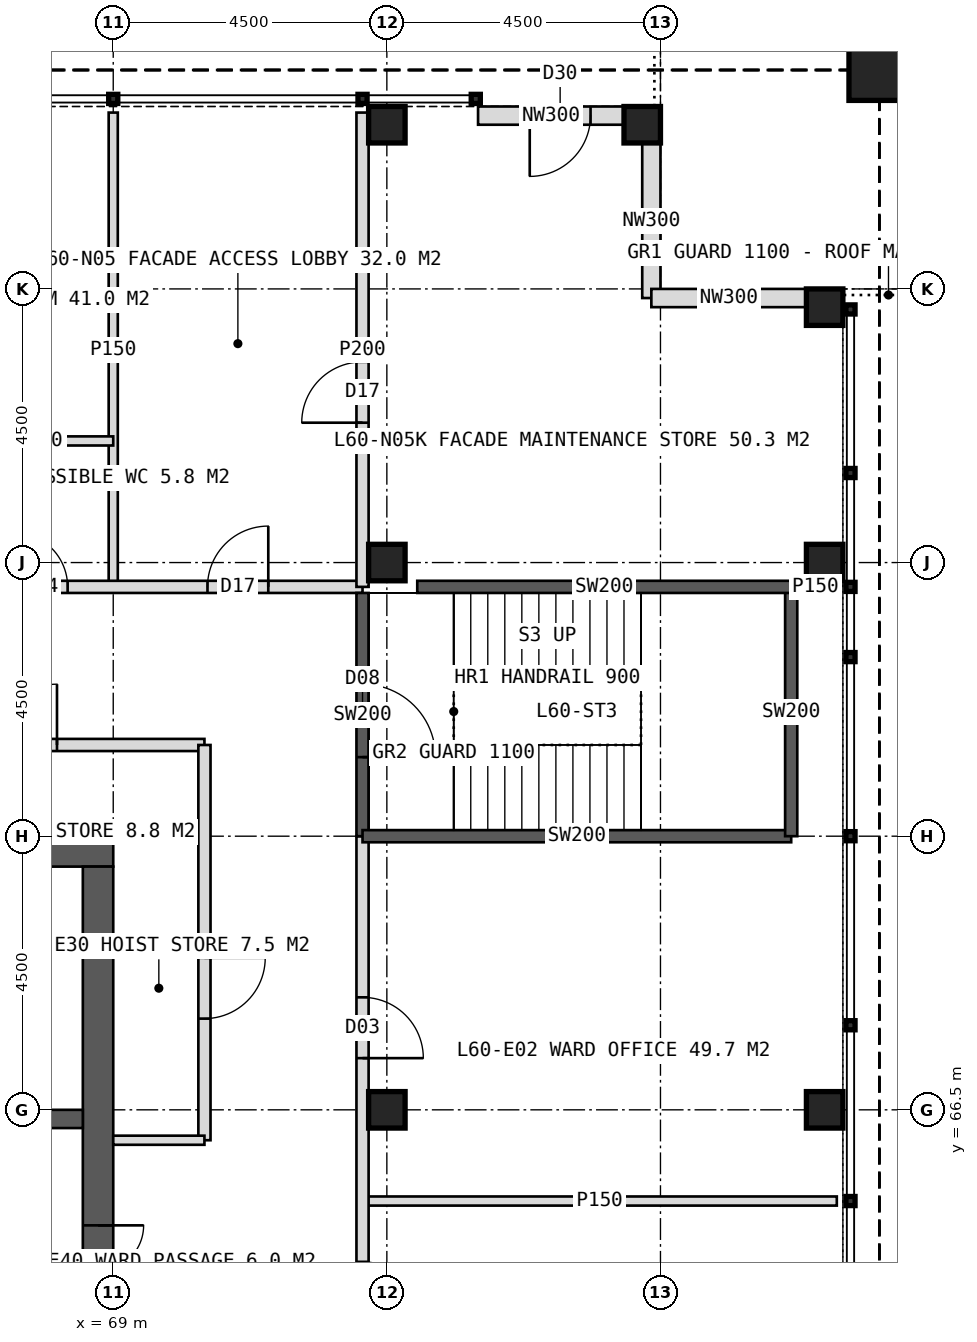
"""IFC4 building model, lengths in metres.
Left out: names, types, materials, properties, quantities, classifications, styles, units other than length and angle.
Written with IfcOpenShell. Run it as: python <this file> out.ifc"""

import sys

from ifc_helpers import new_model, si_unit, direction, frame, frame_2d, origin, origin_2d, place, context, subcontext, project, spatial, rectangle, hollow_rectangle, extrude, element, fill, save


model = new_model("IFC4")
c1 = context("Model", 3, precision=1e-05, world=origin(), true_north=direction((0.0, 1.0)))
c2 = subcontext(c1, "Body", "Model", "MODEL_VIEW")
j1 = project(units=[si_unit("LENGTHUNIT", "METRE"), si_unit("PLANEANGLEUNIT", "RADIAN")], contexts=[c1])
p1 = place(None, origin())
s1 = spatial("IfcSite", under=j1, at=p1, CompositionType="ELEMENT")
p2 = place(p1, origin())
s2 = spatial("IfcBuilding", under=s1, at=p2, CompositionType="ELEMENT")
p3 = place(p2, frame((0.0, 0.0, 250.0)))
s3 = spatial("IfcBuildingStorey", under=s2, at=p3, CompositionType="ELEMENT", Elevation=250.0)
p4 = place(p3, frame((51.0, 70.75, 0.0), z_axis=(0.0, 0.0, 1.0), x_axis=(1.0, 0.0, 0.0)))
e1 = element("IfcWall", 1, at=p4, inside=s3, PredefinedType="SHEAR", context=c2, shape_type="SweptSolid", body=[
    extrude(rectangle(XDim=18.0, YDim=0.5, at=frame_2d((9.0, 0.0))), origin(), (0.0, 0.0, 1.0), 4.0),
])
p5 = place(p4, frame((8.1, 0.0, 0.0)))
e2 = element("IfcOpeningElement", 2, at=p5, cuts=e1, PredefinedType="OPENING", context=c2, shape_type="SweptSolid", body=[
    extrude(rectangle(XDim=1.8, YDim=2.2, at=frame_2d((0.9, 1.1))), frame((0.0, 0.26, 0.0), z_axis=(0.0, -1.0, 0.0), x_axis=(1.0, 0.0, 0.0)), (0.0, 0.0, 1.0), 0.52),
])
p6 = place(p3, frame((68.75, 53.5, 0.0), z_axis=(0.0, 0.0, 1.0), x_axis=(0.0, 1.0, 0.0)))
e3 = element("IfcWall", 3, at=p6, inside=s3, PredefinedType="SHEAR", context=c2, shape_type="SweptSolid", body=[
    extrude(rectangle(XDim=17.0, YDim=0.5, at=frame_2d((8.5, 0.0))), origin(), (0.0, 0.0, 1.0), 4.0),
])
p7 = place(p6, frame((9.6, 0.0, 0.0)))
e4 = element("IfcOpeningElement", 4, at=p7, cuts=e3, PredefinedType="OPENING", context=c2, shape_type="SweptSolid", body=[
    extrude(rectangle(XDim=1.5, YDim=2.2, at=frame_2d((0.75, 1.1))), frame((0.0, 0.26, 0.0), z_axis=(0.0, -1.0, 0.0), x_axis=(1.0, 0.0, 0.0)), (0.0, 0.0, 1.0), 0.52),
])
p8 = place(p3, frame((65.2, 66.35, 0.0), z_axis=(0.0, 0.0, 1.0), x_axis=(1.0, 0.0, 0.0)))
e5 = element("IfcWall", 5, at=p8, inside=s3, PredefinedType="SHEAR", context=c2, shape_type="SweptSolid", body=[
    extrude(rectangle(XDim=3.3, YDim=0.3, at=frame_2d((1.65, 0.0))), origin(), (0.0, 0.0, 1.0), 4.0),
])
p9 = place(p8, frame((1.05, 0.0, 0.0)))
e6 = element("IfcOpeningElement", 6, at=p9, cuts=e5, PredefinedType="OPENING", context=c2, shape_type="SweptSolid", body=[
    extrude(rectangle(XDim=1.2, YDim=2.2, at=frame_2d((0.6, 1.1))), frame((0.0, 0.16, 0.0), z_axis=(0.0, -1.0, 0.0), x_axis=(1.0, 0.0, 0.0)), (0.0, 0.0, 1.0), 0.32),
])
for number, where, z_axis, x_axis in (
    (7, (73.5, 75.5, 0.0), (0.0, 0.0, 1.0), (1.0, 0.0, 0.0)),
    (8, (73.5, 66.5, 0.0), (0.0, 0.0, 1.0), (1.0, 0.0, 0.0)),
    (9, (80.7, 66.5, 0.0), (0.0, 0.0, 1.0), (1.0, 0.0, 0.0)),
    (10, (73.5, 82.7, 0.0), (0.0, 0.0, 1.0), (1.0, 0.0, 0.0)),
    (11, (80.7, 75.5, 0.0), (0.0, 0.0, 1.0), (1.0, 0.0, 0.0)),
    (12, (77.7, 82.7, 0.0), (0.0, 0.0, 1.0), (1.0, 0.0, 0.0)),
    (13, (80.7, 79.7, 0.0), (0.0, 0.0, 1.0), (1.0, 0.0, 0.0)),
):
    element("IfcColumn", number, at=place(p3, frame(where, z_axis=z_axis, x_axis=x_axis)), inside=s3, PredefinedType="COLUMN", context=c2, shape_type="SweptSolid", body=[
        extrude(hollow_rectangle(XDim=0.6, YDim=0.6, WallThickness=0.04, at=origin_2d()), origin(), (0.0, 0.0, 1.0), 4.0),
    ])
p10 = place(p3, frame((81.6, 83.6, 2.0), z_axis=(0.0, 0.0, 1.0), x_axis=(1.0, 0.0, 0.0)))
e14 = element("IfcColumn", 14, at=p10, inside=s3, PredefinedType="COLUMN", context=c2, shape_type="SweptSolid", body=[
    extrude(hollow_rectangle(XDim=1.0, YDim=1.0, WallThickness=0.06, at=origin_2d()), origin(), (0.0, 0.0, 1.0), 2.0),
])
p11 = place(p3, frame((75.0, 82.85, 0.0), z_axis=(0.0, 0.0, 1.0), x_axis=(1.0, 0.0, 0.0)))
e15 = element("IfcWall", 15, at=p11, inside=s3, PredefinedType="ELEMENTEDWALL", context=c2, shape_type="SweptSolid", body=[
    extrude(rectangle(XDim=2.4, YDim=0.3, at=frame_2d((1.2, 0.0))), origin(), (0.0, 0.0, 1.0), 3.226),
])
p12 = place(p11, frame((0.85, 0.0, 0.0)))
e16 = element("IfcOpeningElement", 16, at=p12, cuts=e15, PredefinedType="OPENING", context=c2, shape_type="SweptSolid", body=[
    extrude(rectangle(XDim=1.0, YDim=2.1, at=frame_2d((0.5, 1.05))), frame((0.0, 0.16, 0.0), z_axis=(0.0, -1.0, 0.0), x_axis=(1.0, 0.0, 0.0)), (0.0, 0.0, 1.0), 0.32),
])
for number, where, z_axis, x_axis in (
    (17, (77.85, 82.4, 0.0), (0.0, 0.0, 1.0), (0.0, -1.0, 0.0)),
    (18, (77.85, 79.85, 0.0), (0.0, 0.0, 1.0), (1.0, 0.0, 0.0)),
):
    element("IfcWall", number, at=place(p3, frame(where, z_axis=z_axis, x_axis=x_axis)), inside=s3, PredefinedType="ELEMENTEDWALL", context=c2, shape_type="SweptSolid", body=[
        extrude(rectangle(XDim=2.55, YDim=0.3, at=frame_2d((1.275, 0.0))), origin(), (0.0, 0.0, 1.0), 2.95),
    ])
p13 = place(p3, frame((69.0, 75.1, 0.0), z_axis=(0.0, 0.0, 1.0), x_axis=(0.0, 1.0, 0.0)))
e19 = element("IfcWall", 19, at=p13, inside=s3, PredefinedType="PARTITIONING", context=c2, shape_type="SweptSolid", body=[
    extrude(rectangle(XDim=7.8, YDim=0.15, at=frame_2d((3.9, 0.0))), origin(), (0.0, 0.0, 1.0), 3.75),
])
p14 = place(p3, frame((46.9, 75.1, 0.0), z_axis=(0.0, 0.0, 1.0), x_axis=(1.0, 0.0, 0.0)))
e20 = element("IfcWall", 20, at=p14, inside=s3, PredefinedType="PARTITIONING", context=c2, shape_type="SweptSolid", body=[
    extrude(rectangle(XDim=26.2, YDim=0.2, at=frame_2d((13.1, 0.0))), origin(), (0.0, 0.0, 1.0), 3.75),
])
p15 = place(p14, frame((1.75, 0.0, 0.0)))
e21 = element("IfcOpeningElement", 21, at=p15, cuts=e20, PredefinedType="OPENING", context=c2, shape_type="SweptSolid", body=[
    extrude(rectangle(XDim=1.2, YDim=2.2, at=frame_2d((0.6, 1.1))), frame((0.0, 0.11, 0.0), z_axis=(0.0, -1.0, 0.0), x_axis=(1.0, 0.0, 0.0)), (0.0, 0.0, 1.0), 0.22),
])
p16 = place(p14, frame((6.75, 0.0, 0.0)))
e22 = element("IfcOpeningElement", 22, at=p16, cuts=e20, PredefinedType="OPENING", context=c2, shape_type="SweptSolid", body=[
    extrude(rectangle(XDim=1.0, YDim=2.1, at=frame_2d((0.5, 1.05))), frame((0.0, 0.11, 0.0), z_axis=(0.0, -1.0, 0.0), x_axis=(1.0, 0.0, 0.0)), (0.0, 0.0, 1.0), 0.22),
])
p17 = place(p14, frame((12.75, 0.0, 0.0)))
e23 = element("IfcOpeningElement", 23, at=p17, cuts=e20, PredefinedType="OPENING", context=c2, shape_type="SweptSolid", body=[
    extrude(rectangle(XDim=1.2, YDim=2.2, at=frame_2d((0.6, 1.1))), frame((0.0, 0.11, 0.0), z_axis=(0.0, -1.0, 0.0), x_axis=(1.0, 0.0, 0.0)), (0.0, 0.0, 1.0), 0.22),
])
p18 = place(p14, frame((20.45, 0.0, 0.0)))
e24 = element("IfcOpeningElement", 24, at=p18, cuts=e20, PredefinedType="OPENING", context=c2, shape_type="SweptSolid", body=[
    extrude(rectangle(XDim=0.9, YDim=2.1, at=frame_2d((0.45, 1.05))), frame((0.0, 0.11, 0.0), z_axis=(0.0, -1.0, 0.0), x_axis=(1.0, 0.0, 0.0)), (0.0, 0.0, 1.0), 0.22),
])
p19 = place(p14, frame((18.45, 0.0, 0.0)))
e25 = element("IfcOpeningElement", 25, at=p19, cuts=e20, PredefinedType="OPENING", context=c2, shape_type="SweptSolid", body=[
    extrude(rectangle(XDim=1.0, YDim=2.1, at=frame_2d((0.5, 1.05))), frame((0.0, 0.11, 0.0), z_axis=(0.0, -1.0, 0.0), x_axis=(1.0, 0.0, 0.0)), (0.0, 0.0, 1.0), 0.22),
])
p20 = place(p14, frame((23.65, 0.0, 0.0)))
e26 = element("IfcOpeningElement", 26, at=p20, cuts=e20, PredefinedType="OPENING", context=c2, shape_type="SweptSolid", body=[
    extrude(rectangle(XDim=1.0, YDim=2.1, at=frame_2d((0.5, 1.05))), frame((0.0, 0.11, 0.0), z_axis=(0.0, -1.0, 0.0), x_axis=(1.0, 0.0, 0.0)), (0.0, 0.0, 1.0), 0.22),
])
p21 = place(p3, frame((66.6, 77.5, 0.0), z_axis=(0.0, 0.0, 1.0), x_axis=(1.0, 0.0, 0.0)))
e27 = element("IfcWall", 27, at=p21, inside=s3, PredefinedType="PARTITIONING", context=c2, shape_type="SweptSolid", body=[
    extrude(rectangle(XDim=2.4, YDim=0.15, at=frame_2d((1.2, 0.0))), origin(), (0.0, 0.0, 1.0), 3.75),
])
p22 = place(p3, frame((73.1, 75.1, 0.0), z_axis=(0.0, 0.0, 1.0), x_axis=(0.0, 1.0, 0.0)))
e28 = element("IfcWall", 28, at=p22, inside=s3, PredefinedType="PARTITIONING", context=c2, shape_type="SweptSolid", body=[
    extrude(rectangle(XDim=7.8, YDim=0.2, at=frame_2d((3.9, 0.0))), origin(), (0.0, 0.0, 1.0), 3.75),
])
p23 = place(p22, frame((2.7, 0.0, 0.0)))
e29 = element("IfcOpeningElement", 29, at=p23, cuts=e28, PredefinedType="OPENING", context=c2, shape_type="SweptSolid", body=[
    extrude(rectangle(XDim=1.0, YDim=2.1, at=frame_2d((0.5, 1.05))), frame((0.0, 0.11, 0.0), z_axis=(0.0, -1.0, 0.0), x_axis=(1.0, 0.0, 0.0)), (0.0, 0.0, 1.0), 0.22),
])
p24 = place(p3, frame((62.25, 72.5, 0.0), z_axis=(0.0, 0.0, 1.0), x_axis=(1.0, 0.0, 0.0)))
e30 = element("IfcWall", 30, at=p24, inside=s3, PredefinedType="PARTITIONING", context=c2, shape_type="SweptSolid", body=[
    extrude(rectangle(XDim=8.25, YDim=0.2, at=frame_2d((4.125, 0.0))), origin(), (0.0, 0.0, 1.0), 3.75),
])
p25 = place(p24, frame((0.75, 0.0, 0.0)))
e31 = element("IfcOpeningElement", 31, at=p25, cuts=e30, PredefinedType="OPENING", context=c2, shape_type="SweptSolid", body=[
    extrude(rectangle(XDim=0.9, YDim=2.1, at=frame_2d((0.45, 1.05))), frame((0.0, 0.11, 0.0), z_axis=(0.0, -1.0, 0.0), x_axis=(1.0, 0.0, 0.0)), (0.0, 0.0, 1.0), 0.22),
])
p26 = place(p24, frame((4.825, 0.0, 0.0)))
e32 = element("IfcOpeningElement", 32, at=p26, cuts=e30, PredefinedType="OPENING", context=c2, shape_type="SweptSolid", body=[
    extrude(rectangle(XDim=1.0, YDim=2.1, at=frame_2d((0.5, 1.05))), frame((0.0, 0.11, 0.0), z_axis=(0.0, -1.0, 0.0), x_axis=(1.0, 0.0, 0.0)), (0.0, 0.0, 1.0), 0.22),
])
p27 = place(p3, frame((73.1, 65.0, 0.0), z_axis=(0.0, 0.0, 1.0), x_axis=(1.0, 0.0, 0.0)))
e33 = element("IfcWall", 33, at=p27, inside=s3, PredefinedType="PARTITIONING", context=c2, shape_type="SweptSolid", body=[
    extrude(rectangle(XDim=7.8, YDim=0.15, at=frame_2d((3.9, 0.0))), origin(), (0.0, 0.0, 1.0), 3.75),
])
p28 = place(p3, frame((73.1, 71.0, 0.0), z_axis=(0.0, 0.0, 1.0), x_axis=(0.0, -1.0, 0.0)))
e34 = element("IfcWall", 34, at=p28, inside=s3, PredefinedType="PARTITIONING", context=c2, shape_type="SweptSolid", body=[
    extrude(rectangle(XDim=22.1, YDim=0.2, at=frame_2d((11.05, 0.0))), origin(), (0.0, 0.0, 1.0), 3.75),
])
p29 = place(p28, frame((2.65, 0.0, 0.0)))
e35 = element("IfcOpeningElement", 35, at=p29, cuts=e34, PredefinedType="OPENING", context=c2, shape_type="SweptSolid", body=[
    extrude(rectangle(XDim=1.0, YDim=2.1, at=frame_2d((0.5, 1.05))), frame((0.0, 0.11, 0.0), z_axis=(0.0, -1.0, 0.0), x_axis=(1.0, 0.0, 0.0)), (0.0, 0.0, 1.0), 0.22),
])
p30 = place(p28, frame((7.0, 0.0, 0.0)))
e36 = element("IfcOpeningElement", 36, at=p30, cuts=e34, PredefinedType="OPENING", context=c2, shape_type="SweptSolid", body=[
    extrude(rectangle(XDim=1.0, YDim=2.1, at=frame_2d((0.5, 1.05))), frame((0.0, 0.11, 0.0), z_axis=(0.0, -1.0, 0.0), x_axis=(1.0, 0.0, 0.0)), (0.0, 0.0, 1.0), 0.22),
])
p31 = place(p28, frame((14.35, 0.0, 0.0)))
e37 = element("IfcOpeningElement", 37, at=p31, cuts=e34, PredefinedType="OPENING", context=c2, shape_type="SweptSolid", body=[
    extrude(rectangle(XDim=1.2, YDim=2.2, at=frame_2d((0.6, 1.1))), frame((0.0, 0.11, 0.0), z_axis=(0.0, -1.0, 0.0), x_axis=(1.0, 0.0, 0.0)), (0.0, 0.0, 1.0), 0.22),
])
p32 = place(p28, frame((18.8, 0.0, 0.0)))
e38 = element("IfcOpeningElement", 38, at=p32, cuts=e34, PredefinedType="OPENING", context=c2, shape_type="SweptSolid", body=[
    extrude(rectangle(XDim=1.0, YDim=2.1, at=frame_2d((0.5, 1.05))), frame((0.0, 0.11, 0.0), z_axis=(0.0, -1.0, 0.0), x_axis=(1.0, 0.0, 0.0)), (0.0, 0.0, 1.0), 0.22),
])
p33 = place(p3, frame((80.2, 75.1, 0.0), z_axis=(0.0, 0.0, 1.0), x_axis=(1.0, 0.0, 0.0)))
e39 = element("IfcWall", 39, at=p33, inside=s3, PredefinedType="PARTITIONING", context=c2, shape_type="SweptSolid", body=[
    extrude(rectangle(XDim=0.7, YDim=0.15, at=frame_2d((0.35, 0.0))), origin(), (0.0, 0.0, 1.0), 3.75),
])
p34 = place(p3, frame((69.0, 71.0, 0.0), z_axis=(0.0, 0.0, 1.0), x_axis=(1.0, 0.0, 0.0)))
e40 = element("IfcWall", 40, at=p34, inside=s3, PredefinedType="PARTITIONING", context=c2, shape_type="SweptSolid", body=[
    extrude(rectangle(XDim=1.5, YDim=0.15, at=frame_2d((0.75, 0.0))), origin(), (0.0, 0.0, 1.0), 3.75),
])
p35 = place(p3, frame((70.5, 72.5, 0.0), z_axis=(0.0, 0.0, 1.0), x_axis=(0.0, -1.0, 0.0)))
e41 = element("IfcWall", 41, at=p35, inside=s3, PredefinedType="PARTITIONING", context=c2, shape_type="SweptSolid", body=[
    extrude(rectangle(XDim=6.5, YDim=0.2, at=frame_2d((3.25, 0.0))), origin(), (0.0, 0.0, 1.0), 3.75),
])
p36 = place(p35, frame((3.5, 0.0, 0.0)))
e42 = element("IfcOpeningElement", 42, at=p36, cuts=e41, PredefinedType="OPENING", context=c2, shape_type="SweptSolid", body=[
    extrude(rectangle(XDim=1.0, YDim=2.1, at=frame_2d((0.5, 1.05))), frame((0.0, 0.11, 0.0), z_axis=(0.0, -1.0, 0.0), x_axis=(1.0, 0.0, 0.0)), (0.0, 0.0, 1.0), 0.22),
])
p37 = place(p3, frame((69.0, 66.0, 0.0), z_axis=(0.0, 0.0, 1.0), x_axis=(1.0, 0.0, 0.0)))
e43 = element("IfcWall", 43, at=p37, inside=s3, PredefinedType="PARTITIONING", context=c2, shape_type="SweptSolid", body=[
    extrude(rectangle(XDim=1.5, YDim=0.15, at=frame_2d((0.75, 0.0))), origin(), (0.0, 0.0, 1.0), 3.75),
])
p38 = place(p3, frame((73.1, 75.0, 0.0), z_axis=(0.0, 0.0, 1.0), x_axis=(0.0, -1.0, 0.0)))
e44 = element("IfcWall", 44, at=p38, inside=s3, PredefinedType="SOLIDWALL", context=c2, shape_type="SweptSolid", body=[
    extrude(rectangle(XDim=4.0, YDim=0.2, at=frame_2d((2.0, 0.0))), origin(), (0.0, 0.0, 1.0), 3.75),
])
p39 = place(p38, frame((1.5, 0.0, 0.0)))
e45 = element("IfcOpeningElement", 45, at=p39, cuts=e44, PredefinedType="OPENING", context=c2, shape_type="SweptSolid", body=[
    extrude(rectangle(XDim=1.2, YDim=2.1, at=frame_2d((0.6, 1.05))), frame((0.0, 0.11, 0.0), z_axis=(0.0, -1.0, 0.0), x_axis=(1.0, 0.0, 0.0)), (0.0, 0.0, 1.0), 0.22),
])
p40 = place(p3, frame((73.1, 71.0, 0.0), z_axis=(0.0, 0.0, 1.0), x_axis=(1.0, 0.0, 0.0)))
e46 = element("IfcWall", 46, at=p40, inside=s3, PredefinedType="SOLIDWALL", context=c2, shape_type="SweptSolid", body=[
    extrude(rectangle(XDim=7.05, YDim=0.2, at=frame_2d((3.525, 0.0))), origin(), (0.0, 0.0, 1.0), 3.75),
])
p41 = place(p3, frame((80.15, 71.0, 0.0), z_axis=(0.0, 0.0, 1.0), x_axis=(0.0, 1.0, 0.0)))
e47 = element("IfcWall", 47, at=p41, inside=s3, PredefinedType="SOLIDWALL", context=c2, shape_type="SweptSolid", body=[
    extrude(rectangle(XDim=4.1, YDim=0.2, at=frame_2d((2.05, 0.0))), origin(), (0.0, 0.0, 1.0), 3.75),
])
p42 = place(p3, frame((74.0, 75.1, 0.0), z_axis=(0.0, 0.0, 1.0), x_axis=(1.0, 0.0, 0.0)))
e48 = element("IfcWall", 48, at=p42, inside=s3, PredefinedType="SOLIDWALL", context=c2, shape_type="SweptSolid", body=[
    extrude(rectangle(XDim=6.15, YDim=0.2, at=frame_2d((3.075, 0.0))), origin(), (0.0, 0.0, 1.0), 3.75),
])
p43 = place(p18, origin())
e49 = element("IfcDoor", 49, at=p43, inside=s3, OperationType="SINGLE_SWING_LEFT", PredefinedType="DOOR", context=c2, shape_type="SweptSolid", body=[
    extrude(rectangle(XDim=0.9, YDim=2.1, at=frame_2d((0.45, 1.05))), frame((0.0, 0.025, 0.0), z_axis=(0.0, -1.0, 0.0), x_axis=(1.0, 0.0, 0.0)), (0.0, 0.0, 1.0), 0.05),
])
fill(e24, e49)
p44 = place(p23, origin())
e50 = element("IfcDoor", 50, at=p44, inside=s3, OperationType="SINGLE_SWING_LEFT", PredefinedType="DOOR", context=c2, shape_type="SweptSolid", body=[
    extrude(rectangle(XDim=1.0, YDim=2.1, at=frame_2d((0.5, 1.05))), frame((0.0, 0.025, 0.0), z_axis=(0.0, -1.0, 0.0), x_axis=(1.0, 0.0, 0.0)), (0.0, 0.0, 1.0), 0.05),
])
fill(e29, e50)
p45 = place(p20, origin())
e51 = element("IfcDoor", 51, at=p45, inside=s3, OperationType="SINGLE_SWING_RIGHT", PredefinedType="DOOR", context=c2, shape_type="SweptSolid", body=[
    extrude(rectangle(XDim=1.0, YDim=2.1, at=frame_2d((0.5, 1.05))), frame((0.0, 0.025, 0.0), z_axis=(0.0, -1.0, 0.0), x_axis=(1.0, 0.0, 0.0)), (0.0, 0.0, 1.0), 0.05),
])
fill(e26, e51)
p46 = place(p26, origin())
e52 = element("IfcDoor", 52, at=p46, inside=s3, OperationType="SINGLE_SWING_RIGHT", PredefinedType="DOOR", context=c2, shape_type="SweptSolid", body=[
    extrude(rectangle(XDim=1.0, YDim=2.1, at=frame_2d((0.5, 1.05))), frame((0.0, 0.025, 0.0), z_axis=(0.0, -1.0, 0.0), x_axis=(1.0, 0.0, 0.0)), (0.0, 0.0, 1.0), 0.05),
])
fill(e32, e52)
p47 = place(p29, origin())
e53 = element("IfcDoor", 53, at=p47, inside=s3, OperationType="SINGLE_SWING_RIGHT", PredefinedType="DOOR", context=c2, shape_type="SweptSolid", body=[
    extrude(rectangle(XDim=1.0, YDim=2.1, at=frame_2d((0.5, 1.05))), frame((0.0, 0.025, 0.0), z_axis=(0.0, -1.0, 0.0), x_axis=(1.0, 0.0, 0.0)), (0.0, 0.0, 1.0), 0.05),
])
fill(e35, e53)
p48 = place(p36, origin())
e54 = element("IfcDoor", 54, at=p48, inside=s3, OperationType="SINGLE_SWING_LEFT", PredefinedType="DOOR", context=c2, shape_type="SweptSolid", body=[
    extrude(rectangle(XDim=1.0, YDim=2.1, at=frame_2d((0.5, 1.05))), frame((0.0, 0.025, 0.0), z_axis=(0.0, -1.0, 0.0), x_axis=(1.0, 0.0, 0.0)), (0.0, 0.0, 1.0), 0.05),
])
fill(e42, e54)
p49 = place(p7, origin())
e55 = element("IfcDoor", 55, at=p49, inside=s3, OperationType="DOUBLE_DOOR_SINGLE_SWING", PredefinedType="DOOR", context=c2, shape_type="SweptSolid", body=[
    extrude(rectangle(XDim=1.5, YDim=2.2, at=frame_2d((0.75, 1.1))), frame((0.0, 0.025, 0.0), z_axis=(0.0, -1.0, 0.0), x_axis=(1.0, 0.0, 0.0)), (0.0, 0.0, 1.0), 0.05),
])
fill(e4, e55)
p50 = place(p12, frame((1.0, 0.0, 0.0), z_axis=(0.0, 0.0, 1.0), x_axis=(-1.0, 0.0, 0.0)))
e56 = element("IfcDoor", 56, at=p50, inside=s3, OperationType="SINGLE_SWING_RIGHT", PredefinedType="DOOR", context=c2, shape_type="SweptSolid", body=[
    extrude(rectangle(XDim=1.0, YDim=2.1, at=frame_2d((0.5, 1.05))), frame((0.0, 0.025, 0.0), z_axis=(0.0, -1.0, 0.0), x_axis=(1.0, 0.0, 0.0)), (0.0, 0.0, 1.0), 0.05),
])
fill(e16, e56)
p51 = place(p39, origin())
e57 = element("IfcDoor", 57, at=p51, inside=s3, OperationType="SINGLE_SWING_RIGHT", PredefinedType="DOOR", context=c2, shape_type="SweptSolid", body=[
    extrude(rectangle(XDim=1.2, YDim=2.1, at=frame_2d((0.6, 1.05))), frame((0.0, 0.025, 0.0), z_axis=(0.0, -1.0, 0.0), x_axis=(1.0, 0.0, 0.0)), (0.0, 0.0, 1.0), 0.05),
])
fill(e45, e57)
save(model, sys.argv[1])
